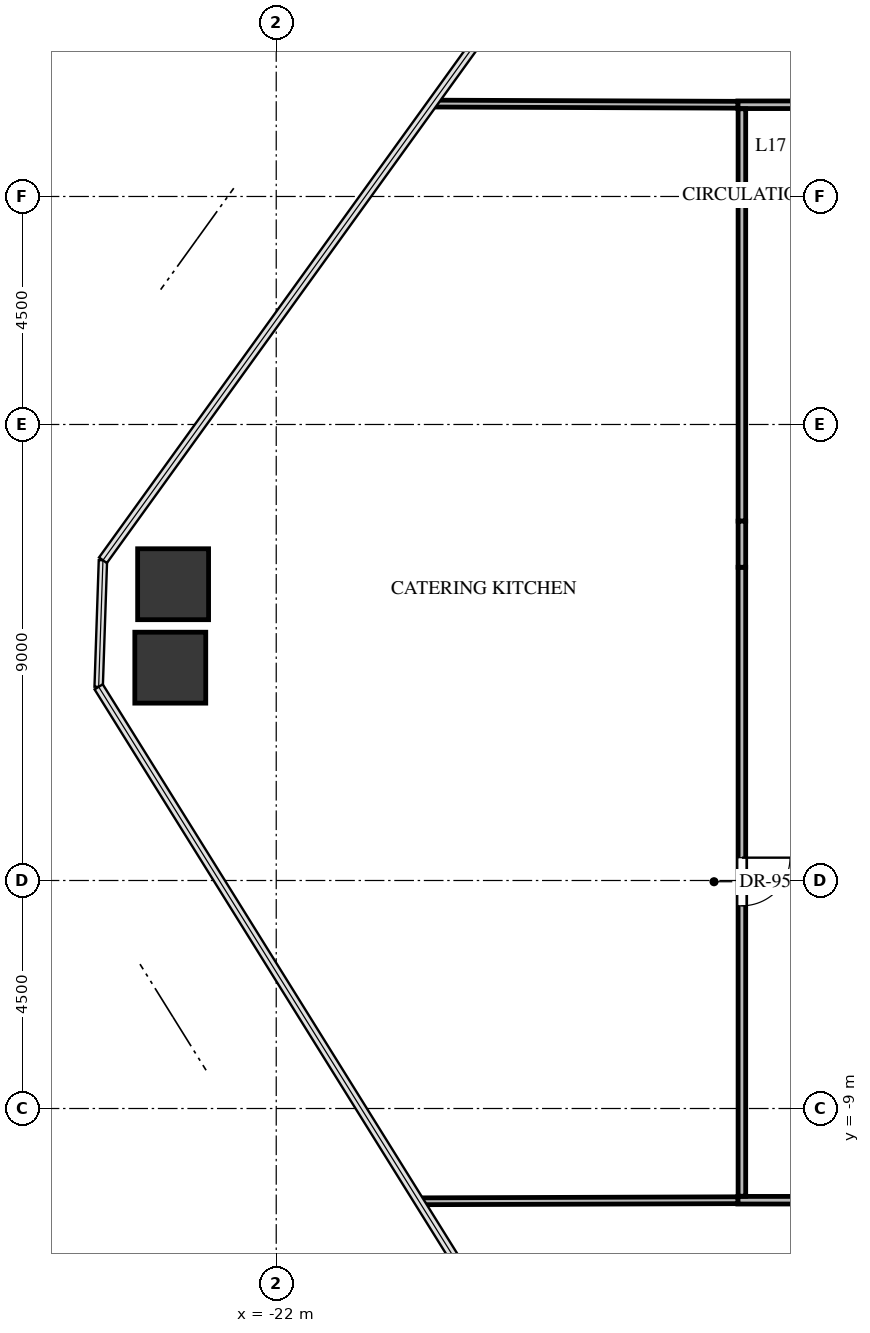
"""IFC4 building model, lengths in metres.
Left out: names, types, materials, properties, quantities, classifications, styles, units other than length and angle.
Written with IfcOpenShell. Run it as: python <this file> out.ifc"""

import sys

from ifc_helpers import new_model, si_unit, direction, frame, frame_2d, origin, origin_2d, place, context, subcontext, project, spatial, rectangle, extrude, source, transform, mapped, element, fill, save


model = new_model("IFC4")
c1 = context("Model", 3, precision=1e-05, world=origin(), true_north=direction((0.0, 1.0)))
c2 = subcontext(c1, "Body", "Model", "MODEL_VIEW")
j1 = project(units=[si_unit("LENGTHUNIT", "METRE"), si_unit("PLANEANGLEUNIT", "RADIAN")], contexts=[c1])
p1 = place(None, origin())
s1 = spatial("IfcSite", under=j1, at=p1, CompositionType="ELEMENT")
p2 = place(p1, origin())
s2 = spatial("IfcBuilding", under=s1, at=p2, CompositionType="ELEMENT")
p3 = place(p2, frame((0.0, 0.0, 68.7)))
s3 = spatial("IfcBuildingStorey", under=s2, at=p3, CompositionType="ELEMENT", Elevation=68.7)
m1 = source(origin(), c2, "Body", "SweptSolid", [
    extrude(rectangle(XDim=1.4, YDim=1.4, at=origin_2d()), origin(), (0.0, 0.0, 1.0), 3.3),
])
for number, where, z_axis, x_axis in (
    (1, (-24.091, -0.3, -0.24), (0.0, 0.0, 1.0), (1.0, 0.0, 0.0)),
    (2, (-24.035, 1.347, -0.24), (0.0, 0.0, 1.0), (1.0, 0.0, 0.0)),
):
    element("IfcColumn", number, at=place(p3, frame(where, z_axis=z_axis, x_axis=x_axis)), inside=s3, PredefinedType="COLUMN", context=c2, shape_type="MappedRepresentation", body=[
        mapped(m1, transform((0.0, 0.0, 0.0), x_axis=(1.0, 0.0, 0.0), y_axis=(0.0, 1.0, 0.0), z_axis=(0.0, 0.0, 1.0), scale=1.0)),
    ])
p4 = place(p3, frame((-10.72, 10.81, 0.0), z_axis=(0.0, 0.0, 1.0), x_axis=(-1.0, 0.0, 0.0)))
e3 = element("IfcWall", 3, at=p4, inside=s3, PredefinedType="PARTITIONING", context=c2, shape_type="SweptSolid", body=[
    extrude(rectangle(XDim=2.17, YDim=0.15, at=frame_2d((1.085, 0.0))), origin(), (0.0, 0.0, 1.0), 3.045),
])
p5 = place(p3, frame((-12.89, -10.81, 0.0), z_axis=(0.0, 0.0, 1.0), x_axis=(1.0, 0.0, 0.0)))
e4 = element("IfcWall", 4, at=p5, inside=s3, PredefinedType="PARTITIONING", context=c2, shape_type="SweptSolid", body=[
    extrude(rectangle(XDim=6.768, YDim=0.15, at=frame_2d((3.384, 0.0))), origin(), (0.0, 0.0, 1.0), 2.13),
])
p6 = place(p5, frame((2.934, 0.0, 0.0)))
e5 = element("IfcOpeningElement", 5, at=p6, cuts=e4, PredefinedType="OPENING", context=c2, shape_type="SweptSolid", body=[
    extrude(rectangle(XDim=0.9, YDim=2.05, at=frame_2d((0.45, 1.025))), frame((0.0, 0.085, 0.0), z_axis=(0.0, -1.0, 0.0), x_axis=(1.0, 0.0, 0.0)), (0.0, 0.0, 1.0), 0.17),
])
p7 = place(p3, frame((-12.81, 10.731, 0.0), z_axis=(0.0, 0.0, 1.0), x_axis=(0.0, -1.0, 0.0)))
e6 = element("IfcWall", 6, at=p7, inside=s3, PredefinedType="PARTITIONING", context=c2, shape_type="SweptSolid", body=[
    extrude(rectangle(XDim=8.139, YDim=0.15, at=frame_2d((4.069, 0.0))), origin(), (0.0, 0.0, 1.0), 3.045),
])
p8 = place(p3, frame((-12.81, 1.682, 0.0), z_axis=(0.0, 0.0, 1.0), x_axis=(0.0, -1.0, 0.0)))
e7 = element("IfcWall", 7, at=p8, inside=s3, PredefinedType="PARTITIONING", context=c2, shape_type="SweptSolid", body=[
    extrude(rectangle(XDim=12.413, YDim=0.15, at=frame_2d((6.207, 0.0))), origin(), (0.0, 0.0, 1.0), 3.045),
])
p9 = place(p8, frame((5.732, 0.0, 0.0)))
e8 = element("IfcOpeningElement", 8, at=p9, cuts=e7, PredefinedType="OPENING", context=c2, shape_type="SweptSolid", body=[
    extrude(rectangle(XDim=0.95, YDim=2.1, at=frame_2d((0.475, 1.05))), frame((0.0, 0.085, 0.0), z_axis=(0.0, -1.0, 0.0), x_axis=(1.0, 0.0, 0.0)), (0.0, 0.0, 1.0), 0.17),
])
p10 = place(p3, frame((-12.81, 2.592, 0.0), z_axis=(0.0, 0.0, 1.0), x_axis=(0.0, -1.0, 0.0)))
e9 = element("IfcWall", 9, at=p10, inside=s3, PredefinedType="PARTITIONING", context=c2, shape_type="SweptSolid", body=[
    extrude(rectangle(XDim=0.91, YDim=0.15, at=frame_2d((0.455, 0.0))), origin(), (0.0, 0.0, 1.0), 2.13),
])
p11 = place(p3, frame((-12.89, 10.81, 0.0), z_axis=(0.0, 0.0, 1.0), x_axis=(-0.999992607823, 0.003845035728, 0.0)))
e10 = element("IfcWall", 10, at=p11, inside=s3, PredefinedType="PARTITIONING", context=c2, shape_type="SweptSolid", body=[
    extrude(rectangle(XDim=6.032, YDim=0.135, at=frame_2d((3.016, 0.0))), origin(), (0.0, 0.0, 1.0), 2.38),
])
p12 = place(p3, frame((-19.182, -10.831, 0.0), z_axis=(0.0, 0.0, 1.0), x_axis=(0.999994432845, 0.003336806783, 0.0)))
e11 = element("IfcWall", 11, at=p12, inside=s3, PredefinedType="PARTITIONING", context=c2, shape_type="SweptSolid", body=[
    extrude(rectangle(XDim=6.292, YDim=0.135, at=frame_2d((3.146, 0.0))), origin(), (0.0, 0.0, 1.0), 2.38),
])
m2 = source(origin(), c2, "Body", "SweptSolid", [
    extrude(rectangle(XDim=0.95, YDim=2.1, at=frame_2d((0.475, 1.05))), frame((0.0, 0.025, 0.0), z_axis=(0.0, -1.0, 0.0), x_axis=(1.0, 0.0, 0.0)), (0.0, 0.0, 1.0), 0.05),
])
p13 = place(p9, origin())
e12 = element("IfcDoor", 12, at=p13, inside=s3, OperationType="SINGLE_SWING_LEFT", PredefinedType="DOOR", context=c2, shape_type="MappedRepresentation", body=[
    mapped(m2, transform((0.0, 0.0, 0.0), x_axis=(1.0, 0.0, 0.0), y_axis=(0.0, 1.0, 0.0), z_axis=(0.0, 0.0, 1.0), scale=1.0)),
])
fill(e8, e12)
save(model, sys.argv[1])
